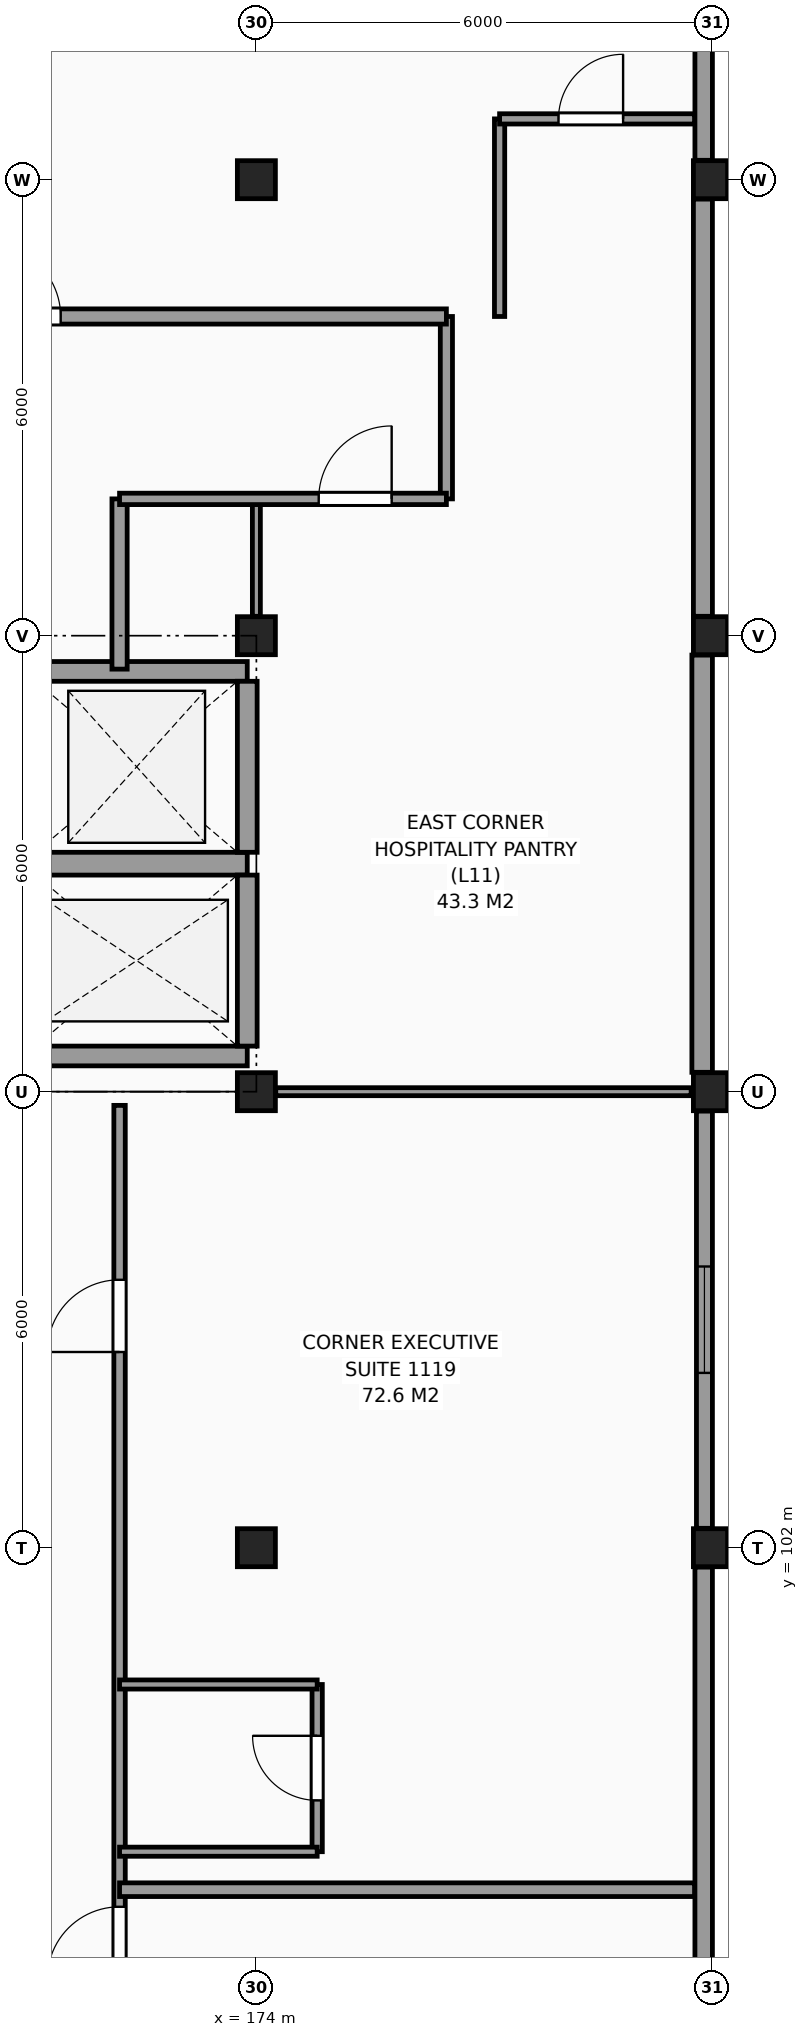
"""IFC4 building model, lengths in metres.
Left out: names, types, materials, properties, quantities, classifications, styles, units other than length and angle.
Written with IfcOpenShell. Run it as: python <this file> out.ifc"""

import sys

from ifc_helpers import new_model, si_unit, direction, frame, frame_2d, origin, origin_2d, place, context, subcontext, project, spatial, rectangle, extrude, element, fill, save


model = new_model("IFC4")
c1 = context("Model", 3, precision=1e-05, world=origin(), true_north=direction((0.0, 1.0)))
c2 = subcontext(c1, "Body", "Model", "MODEL_VIEW")
j1 = project(units=[si_unit("LENGTHUNIT", "METRE"), si_unit("PLANEANGLEUNIT", "RADIAN")], contexts=[c1])
p1 = place(None, origin())
s1 = spatial("IfcSite", under=j1, at=p1, CompositionType="ELEMENT")
p2 = place(p1, origin())
s2 = spatial("IfcBuilding", under=s1, at=p2, CompositionType="ELEMENT")
p3 = place(p2, frame((0.0, 0.0, 44.7)))
s3 = spatial("IfcBuildingStorey", under=s2, at=p3, CompositionType="ELEMENT", Elevation=44.7)
for number, where, z_axis, x_axis in (
    (1, (174.0, 102.0, 0.0), (0.0, 0.0, 1.0), (1.0, 0.0, 0.0)),
    (2, (174.0, 108.0, 0.0), (0.0, 0.0, 1.0), (1.0, 0.0, 0.0)),
    (3, (174.0, 114.0, 0.0), (0.0, 0.0, 1.0), (1.0, 0.0, 0.0)),
    (4, (174.0, 120.0, 0.0), (0.0, 0.0, 1.0), (1.0, 0.0, 0.0)),
    (5, (180.0, 102.0, 0.0), (0.0, 0.0, 1.0), (1.0, 0.0, 0.0)),
    (6, (180.0, 108.0, 0.0), (0.0, 0.0, 1.0), (1.0, 0.0, 0.0)),
    (7, (180.0, 114.0, 0.0), (0.0, 0.0, 1.0), (1.0, 0.0, 0.0)),
    (8, (180.0, 120.0, 0.0), (0.0, 0.0, 1.0), (1.0, 0.0, 0.0)),
):
    element("IfcColumn", number, at=place(p3, frame(where, z_axis=z_axis, x_axis=x_axis)), inside=s3, PredefinedType="COLUMN", context=c2, shape_type="SweptSolid", body=[
        extrude(rectangle(XDim=0.5, YDim=0.5, at=origin_2d()), origin(), (0.0, 0.0, 1.0), 3.3),
    ])
p4 = place(p3, frame((179.885, 96.255, 0.0), z_axis=(0.0, 0.0, 1.0), x_axis=(0.0, 1.0, 0.0)))
e9 = element("IfcWall", 9, at=p4, inside=s3, PredefinedType="SOLIDWALL", context=c2, shape_type="SweptSolid", body=[
    extrude(rectangle(XDim=5.49, YDim=0.23, at=frame_2d((2.745, 0.0))), origin(), (0.0, 0.0, 1.0), 2.4),
])
p5 = place(p3, frame((179.895, 102.255, 0.0), z_axis=(0.0, 0.0, 1.0), x_axis=(0.0, 1.0, 0.0)))
e10 = element("IfcWall", 10, at=p5, inside=s3, PredefinedType="SOLIDWALL", context=c2, shape_type="SweptSolid", body=[
    extrude(rectangle(XDim=5.49, YDim=0.21, at=frame_2d((2.745, 0.0))), origin(), (0.0, 0.0, 1.0), 2.4),
])
p6 = place(p5, frame((2.045, 0.0, 0.8)))
e11 = element("IfcOpeningElement", 11, at=p6, cuts=e10, PredefinedType="OPENING", context=c2, shape_type="SweptSolid", body=[
    extrude(rectangle(XDim=1.4, YDim=1.4, at=frame_2d((0.7, 0.7))), frame((0.0, 0.115, 0.0), z_axis=(0.0, -1.0, 0.0), x_axis=(1.0, 0.0, 0.0)), (0.0, 0.0, 1.0), 0.23),
])
p7 = place(p3, frame((179.865, 108.255, 0.0), z_axis=(0.0, 0.0, 1.0), x_axis=(0.0, 1.0, 0.0)))
e12 = element("IfcWall", 12, at=p7, inside=s3, PredefinedType="SOLIDWALL", context=c2, shape_type="SweptSolid", body=[
    extrude(rectangle(XDim=5.49, YDim=0.27, at=frame_2d((2.745, 0.0))), origin(), (0.0, 0.0, 1.0), 2.4),
])
p8 = place(p3, frame((179.875, 114.255, 0.0), z_axis=(0.0, 0.0, 1.0), x_axis=(0.0, 1.0, 0.0)))
e13 = element("IfcWall", 13, at=p8, inside=s3, PredefinedType="SOLIDWALL", context=c2, shape_type="SweptSolid", body=[
    extrude(rectangle(XDim=5.49, YDim=0.25, at=frame_2d((2.745, 0.0))), origin(), (0.0, 0.0, 1.0), 2.4),
])
p9 = place(p3, frame((179.885, 120.255, 0.0), z_axis=(0.0, 0.0, 1.0), x_axis=(0.0, 1.0, 0.0)))
e14 = element("IfcWall", 14, at=p9, inside=s3, PredefinedType="SOLIDWALL", context=c2, shape_type="SweptSolid", body=[
    extrude(rectangle(XDim=5.49, YDim=0.23, at=frame_2d((2.745, 0.0))), origin(), (0.0, 0.0, 1.0), 2.4),
])
p10 = place(p3, frame((170.97, 108.47, 0.0), z_axis=(0.0, 0.0, 1.0), x_axis=(1.0, 0.0, 0.0)))
e15 = element("IfcWall", 15, at=p10, inside=s3, PredefinedType="SHEAR", context=c2, shape_type="SweptSolid", body=[
    extrude(rectangle(XDim=2.91, YDim=0.26, at=frame_2d((1.455, 0.0))), origin(), (0.0, 0.0, 1.0), 3.3),
])
p11 = place(p3, frame((170.97, 111.0, 0.0), z_axis=(0.0, 0.0, 1.0), x_axis=(1.0, 0.0, 0.0)))
e16 = element("IfcWall", 16, at=p11, inside=s3, PredefinedType="SHEAR", context=c2, shape_type="SweptSolid", body=[
    extrude(rectangle(XDim=2.91, YDim=0.3, at=frame_2d((1.455, 0.0))), origin(), (0.0, 0.0, 1.0), 3.3),
])
p12 = place(p3, frame((173.88, 108.6, 0.0), z_axis=(0.0, 0.0, 1.0), x_axis=(0.0, 1.0, 0.0)))
e17 = element("IfcWall", 17, at=p12, inside=s3, PredefinedType="SHEAR", context=c2, shape_type="SweptSolid", body=[
    extrude(rectangle(XDim=2.25, YDim=0.26, at=frame_2d((1.125, 0.0))), origin(), (0.0, 0.0, 1.0), 3.3),
])
p13 = place(p3, frame((170.97, 113.53, 0.0), z_axis=(0.0, 0.0, 1.0), x_axis=(1.0, 0.0, 0.0)))
e18 = element("IfcWall", 18, at=p13, inside=s3, PredefinedType="SHEAR", context=c2, shape_type="SweptSolid", body=[
    extrude(rectangle(XDim=2.91, YDim=0.26, at=frame_2d((1.455, 0.0))), origin(), (0.0, 0.0, 1.0), 3.3),
])
p14 = place(p3, frame((173.88, 111.15, 0.0), z_axis=(0.0, 0.0, 1.0), x_axis=(0.0, 1.0, 0.0)))
e19 = element("IfcWall", 19, at=p14, inside=s3, PredefinedType="SHEAR", context=c2, shape_type="SweptSolid", body=[
    extrude(rectangle(XDim=2.25, YDim=0.26, at=frame_2d((1.125, 0.0))), origin(), (0.0, 0.0, 1.0), 3.3),
])
p15 = place(p3, frame((172.2, 66.255, 0.0), z_axis=(0.0, 0.0, 1.0), x_axis=(0.0, 1.0, 0.0)))
e20 = element("IfcWall", 20, at=p15, inside=s3, PredefinedType="PARTITIONING", context=c2, shape_type="SweptSolid", body=[
    extrude(rectangle(XDim=41.565, YDim=0.15, at=frame_2d((20.783, 0.0))), origin(), (0.0, 0.0, 1.0), 3.05),
])
p16 = place(p15, frame((7.57, 0.0, 0.0)))
e21 = element("IfcOpeningElement", 21, at=p16, cuts=e20, PredefinedType="OPENING", context=c2, shape_type="SweptSolid", body=[
    extrude(rectangle(XDim=0.95, YDim=2.1, at=frame_2d((0.475, 1.05))), frame((0.0, 0.085, 0.0), z_axis=(0.0, -1.0, 0.0), x_axis=(1.0, 0.0, 0.0)), (0.0, 0.0, 1.0), 0.17),
])
p17 = place(p15, frame((9.37, 0.0, 0.0)))
e22 = element("IfcOpeningElement", 22, at=p17, cuts=e20, PredefinedType="OPENING", context=c2, shape_type="SweptSolid", body=[
    extrude(rectangle(XDim=0.95, YDim=2.1, at=frame_2d((0.475, 1.05))), frame((0.0, 0.085, 0.0), z_axis=(0.0, -1.0, 0.0), x_axis=(1.0, 0.0, 0.0)), (0.0, 0.0, 1.0), 0.17),
])
p18 = place(p15, frame((18.47, 0.0, 0.0)))
e23 = element("IfcOpeningElement", 23, at=p18, cuts=e20, PredefinedType="OPENING", context=c2, shape_type="SweptSolid", body=[
    extrude(rectangle(XDim=0.95, YDim=2.1, at=frame_2d((0.475, 1.05))), frame((0.0, 0.085, 0.0), z_axis=(0.0, -1.0, 0.0), x_axis=(1.0, 0.0, 0.0)), (0.0, 0.0, 1.0), 0.17),
])
p19 = place(p15, frame((22.87, 0.0, 0.0)))
e24 = element("IfcOpeningElement", 24, at=p19, cuts=e20, PredefinedType="OPENING", context=c2, shape_type="SweptSolid", body=[
    extrude(rectangle(XDim=0.95, YDim=2.1, at=frame_2d((0.475, 1.05))), frame((0.0, 0.085, 0.0), z_axis=(0.0, -1.0, 0.0), x_axis=(1.0, 0.0, 0.0)), (0.0, 0.0, 1.0), 0.17),
])
p20 = place(p15, frame((30.07, 0.0, 0.0)))
e25 = element("IfcOpeningElement", 25, at=p20, cuts=e20, PredefinedType="OPENING", context=c2, shape_type="SweptSolid", body=[
    extrude(rectangle(XDim=0.95, YDim=2.1, at=frame_2d((0.475, 1.05))), frame((0.0, 0.085, 0.0), z_axis=(0.0, -1.0, 0.0), x_axis=(1.0, 0.0, 0.0)), (0.0, 0.0, 1.0), 0.17),
])
p21 = place(p15, frame((38.32, 0.0, 0.0)))
e26 = element("IfcOpeningElement", 26, at=p21, cuts=e20, PredefinedType="OPENING", context=c2, shape_type="SweptSolid", body=[
    extrude(rectangle(XDim=0.95, YDim=2.1, at=frame_2d((0.475, 1.05))), frame((0.0, 0.085, 0.0), z_axis=(0.0, -1.0, 0.0), x_axis=(1.0, 0.0, 0.0)), (0.0, 0.0, 1.0), 0.17),
])
p22 = place(p3, frame((172.2, 113.56, 0.0), z_axis=(0.0, 0.0, 1.0), x_axis=(0.0, 1.0, 0.0)))
e27 = element("IfcWall", 27, at=p22, inside=s3, PredefinedType="PARTITIONING", context=c2, shape_type="SweptSolid", body=[
    extrude(rectangle(XDim=2.24, YDim=0.2, at=frame_2d((1.12, 0.0))), origin(), (0.0, 0.0, 1.0), 3.05),
])
p23 = place(p3, frame((174.0, 114.255, 0.0), z_axis=(0.0, 0.0, 1.0), x_axis=(0.0, 1.0, 0.0)))
e28 = element("IfcWall", 28, at=p23, inside=s3, PredefinedType="PARTITIONING", context=c2, shape_type="SweptSolid", body=[
    extrude(rectangle(XDim=1.545, YDim=0.105, at=frame_2d((0.772, 0.0))), origin(), (0.0, 0.0, 1.0), 2.35),
])
p24 = place(p3, frame((174.8, 98.0, 0.0), z_axis=(0.0, 0.0, 1.0), x_axis=(0.0, 1.0, 0.0)))
e29 = element("IfcWall", 29, at=p24, inside=s3, PredefinedType="PARTITIONING", context=c2, shape_type="SweptSolid", body=[
    extrude(rectangle(XDim=2.2, YDim=0.135, at=frame_2d((1.1, 0.0))), origin(), (0.0, 0.0, 1.0), 3.05),
])
p25 = place(p24, frame((0.675, 0.0, 0.0)))
e30 = element("IfcOpeningElement", 30, at=p25, cuts=e29, PredefinedType="OPENING", context=c2, shape_type="SweptSolid", body=[
    extrude(rectangle(XDim=0.85, YDim=2.1, at=frame_2d((0.425, 1.05))), frame((0.0, 0.078, 0.0), z_axis=(0.0, -1.0, 0.0), x_axis=(1.0, 0.0, 0.0)), (0.0, 0.0, 1.0), 0.155),
])
p26 = place(p3, frame((176.5, 115.8, 0.0), z_axis=(0.0, 0.0, 1.0), x_axis=(0.0, 1.0, 0.0)))
e31 = element("IfcWall", 31, at=p26, inside=s3, PredefinedType="PARTITIONING", context=c2, shape_type="SweptSolid", body=[
    extrude(rectangle(XDim=2.4, YDim=0.16, at=frame_2d((1.2, 0.0))), origin(), (0.0, 0.0, 1.0), 3.05),
])
p27 = place(p3, frame((177.2, 118.2, 0.0), z_axis=(0.0, 0.0, 1.0), x_axis=(0.0, 1.0, 0.0)))
e32 = element("IfcWall", 32, at=p27, inside=s3, PredefinedType="PARTITIONING", context=c2, shape_type="SweptSolid", body=[
    extrude(rectangle(XDim=2.6, YDim=0.135, at=frame_2d((1.3, 0.0))), origin(), (0.0, 0.0, 1.0), 3.05),
])
p28 = place(p3, frame((172.2, 97.5, 0.0), z_axis=(0.0, 0.0, 1.0), x_axis=(1.0, 0.0, 0.0)))
e33 = element("IfcWall", 33, at=p28, inside=s3, PredefinedType="PARTITIONING", context=c2, shape_type="SweptSolid", body=[
    extrude(rectangle(XDim=7.565, YDim=0.18, at=frame_2d((3.782, 0.0))), origin(), (0.0, 0.0, 1.0), 3.05),
])
for number, where, z_axis, x_axis in (
    (34, (172.2, 98.0, 0.0), (0.0, 0.0, 1.0), (1.0, 0.0, 0.0)),
    (35, (172.2, 100.2, 0.0), (0.0, 0.0, 1.0), (1.0, 0.0, 0.0)),
):
    element("IfcWall", number, at=place(p3, frame(where, z_axis=z_axis, x_axis=x_axis)), inside=s3, PredefinedType="PARTITIONING", context=c2, shape_type="SweptSolid", body=[
        extrude(rectangle(XDim=2.6, YDim=0.12, at=frame_2d((1.3, 0.0))), origin(), (0.0, 0.0, 1.0), 3.05),
    ])
p29 = place(p3, frame((174.255, 108.0, 0.0), z_axis=(0.0, 0.0, 1.0), x_axis=(1.0, 0.0, 0.0)))
e36 = element("IfcWall", 36, at=p29, inside=s3, PredefinedType="PARTITIONING", context=c2, shape_type="SweptSolid", body=[
    extrude(rectangle(XDim=5.465, YDim=0.105, at=frame_2d((2.732, 0.0))), origin(), (0.0, 0.0, 1.0), 2.35),
])
p30 = place(p3, frame((172.2, 115.8, 0.0), z_axis=(0.0, 0.0, 1.0), x_axis=(1.0, 0.0, 0.0)))
e37 = element("IfcWall", 37, at=p30, inside=s3, PredefinedType="PARTITIONING", context=c2, shape_type="SweptSolid", body=[
    extrude(rectangle(XDim=4.3, YDim=0.15, at=frame_2d((2.15, 0.0))), origin(), (0.0, 0.0, 1.0), 3.05),
])
p31 = place(p30, frame((2.62, 0.0, 0.0)))
e38 = element("IfcOpeningElement", 38, at=p31, cuts=e37, PredefinedType="OPENING", context=c2, shape_type="SweptSolid", body=[
    extrude(rectangle(XDim=0.96, YDim=2.15, at=frame_2d((0.48, 1.075))), frame((0.0, 0.085, 0.0), z_axis=(0.0, -1.0, 0.0), x_axis=(1.0, 0.0, 0.0)), (0.0, 0.0, 1.0), 0.17),
])
p32 = place(p3, frame((102.255, 118.2, 0.0), z_axis=(0.0, 0.0, 1.0), x_axis=(1.0, 0.0, 0.0)))
e39 = element("IfcWall", 39, at=p32, inside=s3, PredefinedType="PARTITIONING", context=c2, shape_type="SweptSolid", body=[
    extrude(rectangle(XDim=74.245, YDim=0.2, at=frame_2d((37.123, 0.0))), origin(), (0.0, 0.0, 1.0), 3.05),
])
p33 = place(p32, frame((0.47, 0.0, 0.0)))
e40 = element("IfcOpeningElement", 40, at=p33, cuts=e39, PredefinedType="OPENING", context=c2, shape_type="SweptSolid", body=[
    extrude(rectangle(XDim=0.95, YDim=2.1, at=frame_2d((0.475, 1.05))), frame((0.0, 0.11, 0.0), z_axis=(0.0, -1.0, 0.0), x_axis=(1.0, 0.0, 0.0)), (0.0, 0.0, 1.0), 0.22),
])
p34 = place(p32, frame((4.87, 0.0, 0.0)))
e41 = element("IfcOpeningElement", 41, at=p34, cuts=e39, PredefinedType="OPENING", context=c2, shape_type="SweptSolid", body=[
    extrude(rectangle(XDim=0.95, YDim=2.1, at=frame_2d((0.475, 1.05))), frame((0.0, 0.11, 0.0), z_axis=(0.0, -1.0, 0.0), x_axis=(1.0, 0.0, 0.0)), (0.0, 0.0, 1.0), 0.22),
])
p35 = place(p32, frame((12.07, 0.0, 0.0)))
e42 = element("IfcOpeningElement", 42, at=p35, cuts=e39, PredefinedType="OPENING", context=c2, shape_type="SweptSolid", body=[
    extrude(rectangle(XDim=0.95, YDim=2.1, at=frame_2d((0.475, 1.05))), frame((0.0, 0.11, 0.0), z_axis=(0.0, -1.0, 0.0), x_axis=(1.0, 0.0, 0.0)), (0.0, 0.0, 1.0), 0.22),
])
p36 = place(p32, frame((16.27, 0.0, 0.0)))
e43 = element("IfcOpeningElement", 43, at=p36, cuts=e39, PredefinedType="OPENING", context=c2, shape_type="SweptSolid", body=[
    extrude(rectangle(XDim=0.95, YDim=2.1, at=frame_2d((0.475, 1.05))), frame((0.0, 0.11, 0.0), z_axis=(0.0, -1.0, 0.0), x_axis=(1.0, 0.0, 0.0)), (0.0, 0.0, 1.0), 0.22),
])
p37 = place(p32, frame((25.57, 0.0, 0.0)))
e44 = element("IfcOpeningElement", 44, at=p37, cuts=e39, PredefinedType="OPENING", context=c2, shape_type="SweptSolid", body=[
    extrude(rectangle(XDim=0.95, YDim=2.1, at=frame_2d((0.475, 1.05))), frame((0.0, 0.11, 0.0), z_axis=(0.0, -1.0, 0.0), x_axis=(1.0, 0.0, 0.0)), (0.0, 0.0, 1.0), 0.22),
])
p38 = place(p32, frame((30.07, 0.0, 0.0)))
e45 = element("IfcOpeningElement", 45, at=p38, cuts=e39, PredefinedType="OPENING", context=c2, shape_type="SweptSolid", body=[
    extrude(rectangle(XDim=0.95, YDim=2.1, at=frame_2d((0.475, 1.05))), frame((0.0, 0.11, 0.0), z_axis=(0.0, -1.0, 0.0), x_axis=(1.0, 0.0, 0.0)), (0.0, 0.0, 1.0), 0.22),
])
p39 = place(p32, frame((38.32, 0.0, 0.0)))
e46 = element("IfcOpeningElement", 46, at=p39, cuts=e39, PredefinedType="OPENING", context=c2, shape_type="SweptSolid", body=[
    extrude(rectangle(XDim=0.95, YDim=2.1, at=frame_2d((0.475, 1.05))), frame((0.0, 0.11, 0.0), z_axis=(0.0, -1.0, 0.0), x_axis=(1.0, 0.0, 0.0)), (0.0, 0.0, 1.0), 0.22),
])
p40 = place(p32, frame((46.27, 0.0, 0.0)))
e47 = element("IfcOpeningElement", 47, at=p40, cuts=e39, PredefinedType="OPENING", context=c2, shape_type="SweptSolid", body=[
    extrude(rectangle(XDim=0.95, YDim=2.1, at=frame_2d((0.475, 1.05))), frame((0.0, 0.11, 0.0), z_axis=(0.0, -1.0, 0.0), x_axis=(1.0, 0.0, 0.0)), (0.0, 0.0, 1.0), 0.22),
])
p41 = place(p32, frame((48.47, 0.0, 0.0)))
e48 = element("IfcOpeningElement", 48, at=p41, cuts=e39, PredefinedType="OPENING", context=c2, shape_type="SweptSolid", body=[
    extrude(rectangle(XDim=0.95, YDim=2.1, at=frame_2d((0.475, 1.05))), frame((0.0, 0.11, 0.0), z_axis=(0.0, -1.0, 0.0), x_axis=(1.0, 0.0, 0.0)), (0.0, 0.0, 1.0), 0.22),
])
p42 = place(p32, frame((54.47, 0.0, 0.0)))
e49 = element("IfcOpeningElement", 49, at=p42, cuts=e39, PredefinedType="OPENING", context=c2, shape_type="SweptSolid", body=[
    extrude(rectangle(XDim=0.95, YDim=2.1, at=frame_2d((0.475, 1.05))), frame((0.0, 0.11, 0.0), z_axis=(0.0, -1.0, 0.0), x_axis=(1.0, 0.0, 0.0)), (0.0, 0.0, 1.0), 0.22),
])
p43 = place(p32, frame((64.27, 0.0, 0.0)))
e50 = element("IfcOpeningElement", 50, at=p43, cuts=e39, PredefinedType="OPENING", context=c2, shape_type="SweptSolid", body=[
    extrude(rectangle(XDim=0.95, YDim=2.1, at=frame_2d((0.475, 1.05))), frame((0.0, 0.11, 0.0), z_axis=(0.0, -1.0, 0.0), x_axis=(1.0, 0.0, 0.0)), (0.0, 0.0, 1.0), 0.22),
])
p44 = place(p32, frame((68.22, 0.0, 0.0)))
e51 = element("IfcOpeningElement", 51, at=p44, cuts=e39, PredefinedType="OPENING", context=c2, shape_type="SweptSolid", body=[
    extrude(rectangle(XDim=0.95, YDim=2.1, at=frame_2d((0.475, 1.05))), frame((0.0, 0.11, 0.0), z_axis=(0.0, -1.0, 0.0), x_axis=(1.0, 0.0, 0.0)), (0.0, 0.0, 1.0), 0.22),
])
p45 = place(p3, frame((177.2, 120.8, 0.0), z_axis=(0.0, 0.0, 1.0), x_axis=(1.0, 0.0, 0.0)))
e52 = element("IfcWall", 52, at=p45, inside=s3, PredefinedType="PARTITIONING", context=c2, shape_type="SweptSolid", body=[
    extrude(rectangle(XDim=2.565, YDim=0.135, at=frame_2d((1.282, 0.0))), origin(), (0.0, 0.0, 1.0), 3.05),
])
p46 = place(p45, frame((0.775, 0.0, 0.0)))
e53 = element("IfcOpeningElement", 53, at=p46, cuts=e52, PredefinedType="OPENING", context=c2, shape_type="SweptSolid", body=[
    extrude(rectangle(XDim=0.85, YDim=2.1, at=frame_2d((0.425, 1.05))), frame((0.0, 0.078, 0.0), z_axis=(0.0, -1.0, 0.0), x_axis=(1.0, 0.0, 0.0)), (0.0, 0.0, 1.0), 0.155),
])
p47 = place(p6, origin())
e54 = element("IfcWindow", 54, at=p47, inside=s3, PartitioningType="SINGLE_PANEL", PredefinedType="WINDOW", context=c2, shape_type="SweptSolid", body=[
    extrude(rectangle(XDim=1.4, YDim=1.4, at=frame_2d((0.7, 0.7))), frame((0.0, 0.03, 0.0), z_axis=(0.0, -1.0, 0.0), x_axis=(1.0, 0.0, 0.0)), (0.0, 0.0, 1.0), 0.06),
])
fill(e11, e54)
p48 = place(p46, origin())
e55 = element("IfcDoor", 55, at=p48, inside=s3, OperationType="SINGLE_SWING_RIGHT", PredefinedType="DOOR", context=c2, shape_type="SweptSolid", body=[
    extrude(rectangle(XDim=0.85, YDim=2.1, at=frame_2d((0.425, 1.05))), frame((0.0, 0.025, 0.0), z_axis=(0.0, -1.0, 0.0), x_axis=(1.0, 0.0, 0.0)), (0.0, 0.0, 1.0), 0.05),
])
fill(e53, e55)
p49 = place(p44, origin())
e56 = element("IfcDoor", 56, at=p49, inside=s3, OperationType="SINGLE_SWING_LEFT", PredefinedType="DOOR", context=c2, shape_type="SweptSolid", body=[
    extrude(rectangle(XDim=0.95, YDim=2.1, at=frame_2d((0.475, 1.05))), frame((0.0, 0.025, 0.0), z_axis=(0.0, -1.0, 0.0), x_axis=(1.0, 0.0, 0.0)), (0.0, 0.0, 1.0), 0.05),
])
fill(e51, e56)
p50 = place(p20, origin())
e57 = element("IfcDoor", 57, at=p50, inside=s3, OperationType="SINGLE_SWING_LEFT", PredefinedType="DOOR", context=c2, shape_type="SweptSolid", body=[
    extrude(rectangle(XDim=0.95, YDim=2.1, at=frame_2d((0.475, 1.05))), frame((0.0, 0.025, 0.0), z_axis=(0.0, -1.0, 0.0), x_axis=(1.0, 0.0, 0.0)), (0.0, 0.0, 1.0), 0.05),
])
fill(e25, e57)
p51 = place(p25, origin())
e58 = element("IfcDoor", 58, at=p51, inside=s3, OperationType="SINGLE_SWING_RIGHT", PredefinedType="DOOR", context=c2, shape_type="SweptSolid", body=[
    extrude(rectangle(XDim=0.85, YDim=2.1, at=frame_2d((0.425, 1.05))), frame((0.0, 0.025, 0.0), z_axis=(0.0, -1.0, 0.0), x_axis=(1.0, 0.0, 0.0)), (0.0, 0.0, 1.0), 0.05),
])
fill(e30, e58)
p52 = place(p21, origin())
e59 = element("IfcDoor", 59, at=p52, inside=s3, OperationType="SINGLE_SWING_LEFT", PredefinedType="DOOR", context=c2, shape_type="SweptSolid", body=[
    extrude(rectangle(XDim=0.95, YDim=2.1, at=frame_2d((0.475, 1.05))), frame((0.0, 0.025, 0.0), z_axis=(0.0, -1.0, 0.0), x_axis=(1.0, 0.0, 0.0)), (0.0, 0.0, 1.0), 0.05),
])
fill(e26, e59)
p53 = place(p31, origin())
e60 = element("IfcDoor", 60, at=p53, inside=s3, OperationType="SINGLE_SWING_RIGHT", PredefinedType="DOOR", context=c2, shape_type="SweptSolid", body=[
    extrude(rectangle(XDim=0.96, YDim=2.15, at=frame_2d((0.48, 1.075))), frame((0.0, 0.025, 0.0), z_axis=(0.0, -1.0, 0.0), x_axis=(1.0, 0.0, 0.0)), (0.0, 0.0, 1.0), 0.05),
])
fill(e38, e60)
save(model, sys.argv[1])
